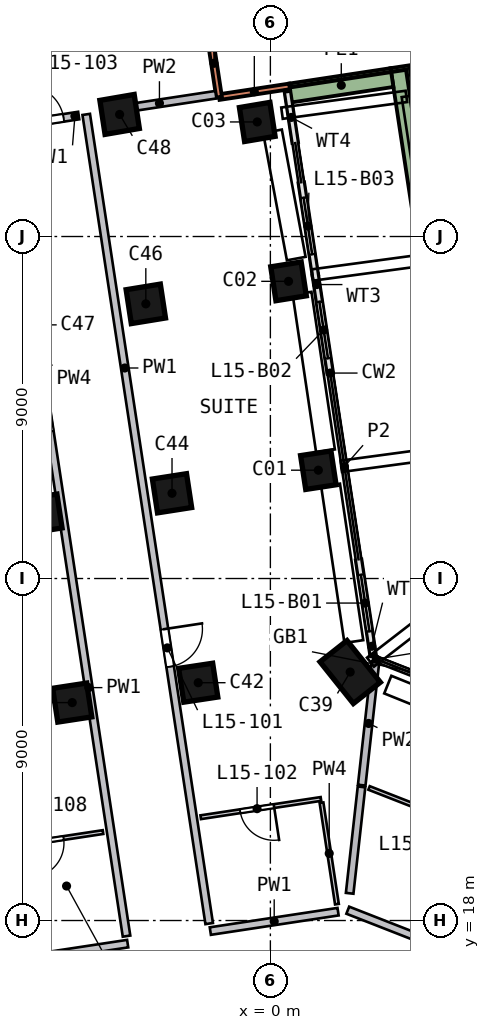
"""IFC4 building model, lengths in metres.
Left out: names, types, materials, properties, quantities, classifications, styles, units other than length and angle.
Written with IfcOpenShell. Run it as: python <this file> out.ifc"""

import sys

from ifc_helpers import new_model, si_unit, direction, frame, frame_2d, origin, origin_2d, place, context, subcontext, project, spatial, rectangle, extrude, element, fill, save


model = new_model("IFC4")
c1 = context("Model", 3, precision=1e-05, world=origin(), true_north=direction((0.0, 1.0)))
c2 = subcontext(c1, "Body", "Model", "MODEL_VIEW")
j1 = project(units=[si_unit("LENGTHUNIT", "METRE"), si_unit("PLANEANGLEUNIT", "RADIAN")], contexts=[c1])
p1 = place(None, origin())
s1 = spatial("IfcSite", under=j1, at=p1, CompositionType="ELEMENT")
p2 = place(p1, origin())
s2 = spatial("IfcBuilding", under=s1, at=p2, CompositionType="ELEMENT")
p3 = place(p2, frame((0.0, 0.0, 68.0)))
s3 = spatial("IfcBuildingStorey", under=s2, at=p3, CompositionType="ELEMENT", Elevation=68.0)
p4 = place(p3, frame((1.426, 29.891, 0.0), z_axis=(-0.13520716, -0.033347057, 0.990256026), x_axis=(-0.152178078, 0.988274013, 0.012502286)))
e1 = element("IfcColumn", 1, at=p4, inside=s3, PredefinedType="COLUMN", context=c2, shape_type="SweptSolid", body=[
    extrude(rectangle(XDim=0.9, YDim=0.8, at=origin_2d()), origin(), (0.0, 0.0, 1.0), 3.221),
])
p5 = place(p3, frame((0.663, 34.913, 0.0), z_axis=(-0.15161007, -0.075654179, 0.985540883), x_axis=(-0.158514591, 0.986022718, 0.051306173)))
e2 = element("IfcColumn", 2, at=p5, inside=s3, PredefinedType="COLUMN", context=c2, shape_type="SweptSolid", body=[
    extrude(rectangle(XDim=0.9, YDim=0.8, at=origin_2d()), origin(), (0.0, 0.0, 1.0), 3.237),
])
p6 = place(p3, frame((-0.144, 39.159, 0.0), z_axis=(-0.164084546, -0.117610165, 0.979410083), x_axis=(-0.166101117, 0.981984673, 0.090091735)))
e3 = element("IfcColumn", 3, at=p6, inside=s3, PredefinedType="COLUMN", context=c2, shape_type="SweptSolid", body=[
    extrude(rectangle(XDim=0.9, YDim=0.8, at=origin_2d()), origin(), (0.0, 0.0, 1.0), 3.257),
])
p7 = place(p3, frame((2.241, 24.527, 0.0), z_axis=(-0.116747517, 0.00972896, 0.993113974), x_axis=(0.616715127, -0.783093296, 0.080170701)))
e4 = element("IfcColumn", 4, at=p7, inside=s3, PredefinedType="COLUMN", context=c2, shape_type="SweptSolid", body=[
    extrude(rectangle(XDim=1.4, YDim=0.9, at=origin_2d()), origin(), (0.0, 0.0, 1.0), 3.212),
])
for number, where, z_axis, x_axis in (
    (5, (-1.76, 24.269, 0.0), (-0.115, -0.009, 0.993), (-0.149, 0.989, -0.008)),
    (6, (-5.078, 23.765, 0.0), (-0.113, -0.025, 0.993), (-0.151, 0.988, 0.008)),
):
    element("IfcColumn", number, at=place(p3, frame(where, z_axis=z_axis, x_axis=x_axis)), inside=s3, PredefinedType="COLUMN", context=c2, shape_type="SweptSolid", body=[
        extrude(rectangle(XDim=0.9, YDim=0.9, at=origin_2d()), origin(), (0.0, 0.0, 1.0), 3.211),
    ])
p8 = place(p3, frame((-2.428, 29.305, 0.0), z_axis=(-0.132201605, -0.051516958, 0.989883194), x_axis=(-0.154308616, 0.987542922, 0.030786825)))
e7 = element("IfcColumn", 7, at=p8, inside=s3, PredefinedType="COLUMN", context=c2, shape_type="SweptSolid", body=[
    extrude(rectangle(XDim=0.9, YDim=0.9, at=origin_2d()), origin(), (0.0, 0.0, 1.0), 3.223),
])
p9 = place(p3, frame((-5.841, 28.787, 0.0), z_axis=(-0.129544243, -0.067687056, 0.98926071), x_axis=(-0.156761028, 0.986518959, 0.046971516)))
e8 = element("IfcColumn", 8, at=p9, inside=s3, PredefinedType="COLUMN", context=c2, shape_type="SweptSolid", body=[
    extrude(rectangle(XDim=0.9, YDim=0.9, at=origin_2d()), origin(), (0.0, 0.0, 1.0), 3.225),
])
p10 = place(p3, frame((-3.096, 34.342, 0.0), z_axis=(-0.148658938, -0.093279151, 0.984479314), x_axis=(-0.161106511, 0.984525146, 0.068955991)))
e9 = element("IfcColumn", 9, at=p10, inside=s3, PredefinedType="COLUMN", context=c2, shape_type="SweptSolid", body=[
    extrude(rectangle(XDim=0.9, YDim=0.9, at=origin_2d()), origin(), (0.0, 0.0, 1.0), 3.24),
])
p11 = place(p3, frame((-3.765, 39.377, 0.0), z_axis=(-0.164608531, -0.134244576, 0.977180856), x_axis=(-0.168918924, 0.979895845, 0.10616275)))
e10 = element("IfcColumn", 10, at=p11, inside=s3, PredefinedType="COLUMN", context=c2, shape_type="SweptSolid", body=[
    extrude(rectangle(XDim=0.9, YDim=0.9, at=origin_2d()), origin(), (0.0, 0.0, 1.0), 3.264),
])
p12 = place(p3, frame((0.504, 39.95, 0.0), z_axis=(0.0, 0.0, 1.0), x_axis=(-0.98866636, -0.150129371, 0.0)))
e11 = element("IfcWall", 11, at=p12, inside=s3, PredefinedType="SOLIDWALL", context=c2, shape_type="SweptSolid", body=[
    extrude(rectangle(XDim=1.875, YDim=0.15, at=frame_2d((0.938, 0.0))), origin(), (0.0, 0.0, 1.0), 3.19),
])
p13 = place(p3, frame((-1.35, 39.669, 0.0), z_axis=(0.0, 0.0, 1.0), x_axis=(-0.150150918, 0.988663088, 0.0)))
e12 = element("IfcWall", 12, at=p13, inside=s3, PredefinedType="SOLIDWALL", context=c2, shape_type="SweptSolid", body=[
    extrude(rectangle(XDim=1.8, YDim=0.15, at=frame_2d((0.9, 0.0))), origin(), (0.0, 0.0, 1.0), 3.19),
])
p14 = place(p3, frame((2.697, 25.017, 0.0), z_axis=(0.0, 0.0, 1.0), x_axis=(-0.150172469, 0.988659815, 0.0)))
e13 = element("IfcWall", 13, at=p14, inside=s3, PredefinedType="SOLIDWALL", context=c2, shape_type="SweptSolid", body=[
    extrude(rectangle(XDim=2.502, YDim=0.15, at=frame_2d((1.251, 0.0))), origin(), (0.0, 0.0, 1.0), 2.425),
])
p15 = place(p14, frame((0.602, 0.0, 0.0)))
e14 = element("IfcOpeningElement", 14, at=p15, cuts=e13, PredefinedType="OPENING", context=c2, shape_type="SweptSolid", body=[
    extrude(rectangle(XDim=1.5, YDim=2.4, at=frame_2d((0.75, 1.2))), frame((0.0, 0.085, 0.0), z_axis=(0.0, -1.0, 0.0), x_axis=(1.0, 0.0, 0.0)), (0.0, 0.0, 1.0), 0.17),
])
p16 = place(p3, frame((1.575, 32.403, 0.0), z_axis=(0.0, 0.0, 1.0), x_axis=(-0.150214162, 0.988653481, 0.0)))
e15 = element("IfcWall", 15, at=p16, inside=s3, PredefinedType="SOLIDWALL", context=c2, shape_type="SweptSolid", body=[
    extrude(rectangle(XDim=2.618, YDim=0.15, at=frame_2d((1.309, 0.0))), origin(), (0.0, 0.0, 1.0), 2.425),
])
p17 = place(p16, frame((0.4, 0.0, 0.0)))
e16 = element("IfcOpeningElement", 16, at=p17, cuts=e15, PredefinedType="OPENING", context=c2, shape_type="SweptSolid", body=[
    extrude(rectangle(XDim=1.5, YDim=2.4, at=frame_2d((0.75, 1.2))), frame((0.0, 0.085, 0.0), z_axis=(0.0, -1.0, 0.0), x_axis=(1.0, 0.0, 0.0)), (0.0, 0.0, 1.0), 0.17),
])
p18 = place(p3, frame((1.182, 34.991, 0.0), z_axis=(0.0, 0.0, 1.0), x_axis=(-0.150259924, 0.988646527, 0.0)))
e17 = element("IfcWall", 17, at=p18, inside=s3, PredefinedType="SOLIDWALL", context=c2, shape_type="SweptSolid", body=[
    extrude(rectangle(XDim=2.45, YDim=0.15, at=frame_2d((1.225, 0.0))), origin(), (0.0, 0.0, 1.0), 2.425),
])
p19 = place(p18, frame((0.55, 0.0, 0.0)))
e18 = element("IfcOpeningElement", 18, at=p19, cuts=e17, PredefinedType="OPENING", context=c2, shape_type="SweptSolid", body=[
    extrude(rectangle(XDim=1.5, YDim=2.4, at=frame_2d((0.75, 1.2))), frame((0.0, 0.085, 0.0), z_axis=(0.0, -1.0, 0.0), x_axis=(1.0, 0.0, 0.0)), (0.0, 0.0, 1.0), 0.17),
])
p20 = place(p3, frame((0.653, 38.473, 0.0), z_axis=(0.0, 0.0, 1.0), x_axis=(-0.15015126, 0.988663036, 0.0)))
e19 = element("IfcWall", 19, at=p20, inside=s3, PredefinedType="SOLIDWALL", context=c2, shape_type="SweptSolid", body=[
    extrude(rectangle(XDim=1.338, YDim=0.15, at=frame_2d((0.669, 0.0))), origin(), (0.0, 0.0, 1.0), 2.425),
])
p21 = place(p3, frame((5.421, 27.229, 0.0), z_axis=(0.0, 0.0, 1.0), x_axis=(-0.150219629, 0.98865265, 0.0)))
e20 = element("IfcWall", 20, at=p21, inside=s3, PredefinedType="SOLIDWALL", context=c2, shape_type="SweptSolid", body=[
    extrude(rectangle(XDim=13.39, YDim=0.5, at=frame_2d((6.695, 0.0))), origin(), (0.0, 0.0, 1.0), 0.7),
])
p22 = place(p3, frame((3.2, 40.183, 0.0), z_axis=(0.0, 0.0, 1.0), x_axis=(-0.988647191, -0.150255557, 0.0)))
e21 = element("IfcWall", 21, at=p22, inside=s3, PredefinedType="SOLIDWALL", context=c2, shape_type="SweptSolid", body=[
    extrude(rectangle(XDim=2.699, YDim=0.5, at=frame_2d((1.349, 0.0))), origin(), (0.0, 0.0, 1.0), 0.7),
])
p23 = place(p3, frame((-6.825, 38.913, 0.0), z_axis=(0.0, 0.0, 1.0), x_axis=(0.988667412, 0.150122447, 0.0)))
e22 = element("IfcWall", 22, at=p23, inside=s3, PredefinedType="SOLIDWALL", context=c2, shape_type="SweptSolid", body=[
    extrude(rectangle(XDim=1.802, YDim=0.2, at=frame_2d((0.901, 0.0))), origin(), (0.0, 0.0, 1.0), 3.19),
])
p24 = place(p23, frame((0.4, 0.0, 0.0)))
e23 = element("IfcOpeningElement", 23, at=p24, cuts=e22, PredefinedType="OPENING", context=c2, shape_type="SweptSolid", body=[
    extrude(rectangle(XDim=1.0, YDim=2.1, at=frame_2d((0.5, 1.05))), frame((0.0, 0.11, 0.0), z_axis=(0.0, -1.0, 0.0), x_axis=(1.0, 0.0, 0.0)), (0.0, 0.0, 1.0), 0.22),
])
p25 = place(p3, frame((-3.755, 17.392, 0.0), z_axis=(0.0, 0.0, 1.0), x_axis=(-0.988654649, -0.150206477, 0.0)))
e24 = element("IfcWall", 24, at=p25, inside=s3, PredefinedType="SOLIDWALL", context=c2, shape_type="SweptSolid", body=[
    extrude(rectangle(XDim=3.678, YDim=0.2, at=frame_2d((1.839, 0.0))), origin(), (0.0, 0.0, 1.0), 3.19),
])
p26 = place(p3, frame((-3.785, 17.589, 0.0), z_axis=(0.0, 0.0, 1.0), x_axis=(-0.150228123, 0.98865136, 0.0)))
e25 = element("IfcWall", 25, at=p26, inside=s3, PredefinedType="SOLIDWALL", context=c2, shape_type="SweptSolid", body=[
    extrude(rectangle(XDim=21.538, YDim=0.2, at=frame_2d((10.769, 0.0))), origin(), (0.0, 0.0, 1.0), 3.19),
])
p27 = place(p26, frame((13.429, 0.0, 0.0)))
e26 = element("IfcOpeningElement", 26, at=p27, cuts=e25, PredefinedType="OPENING", context=c2, shape_type="SweptSolid", body=[
    extrude(rectangle(XDim=1.0, YDim=2.1, at=frame_2d((0.5, 1.05))), frame((0.0, 0.11, 0.0), z_axis=(0.0, -1.0, 0.0), x_axis=(1.0, 0.0, 0.0)), (0.0, 0.0, 1.0), 0.22),
])
p28 = place(p3, frame((-4.846, 39.213, 0.0), z_axis=(0.0, 0.0, 1.0), x_axis=(0.150218727, -0.988652787, 0.0)))
e27 = element("IfcWall", 27, at=p28, inside=s3, PredefinedType="SOLIDWALL", context=c2, shape_type="SweptSolid", body=[
    extrude(rectangle(XDim=21.538, YDim=0.2, at=frame_2d((10.769, 0.0))), origin(), (0.0, 0.0, 1.0), 3.19),
])
p29 = place(p28, frame((13.7, 0.0, 0.0)))
e28 = element("IfcOpeningElement", 28, at=p29, cuts=e27, PredefinedType="OPENING", context=c2, shape_type="SweptSolid", body=[
    extrude(rectangle(XDim=1.0, YDim=2.1, at=frame_2d((0.5, 1.05))), frame((0.0, 0.11, 0.0), z_axis=(0.0, -1.0, 0.0), x_axis=(1.0, 0.0, 0.0)), (0.0, 0.0, 1.0), 0.22),
])
p30 = place(p3, frame((1.781, 18.233, 0.0), z_axis=(0.0, 0.0, 1.0), x_axis=(-0.988652246, -0.150222291, 0.0)))
e29 = element("IfcWall", 29, at=p30, inside=s3, PredefinedType="SOLIDWALL", context=c2, shape_type="SweptSolid", body=[
    extrude(rectangle(XDim=3.4, YDim=0.2, at=frame_2d((1.7, 0.0))), origin(), (0.0, 0.0, 1.0), 3.19),
])
p31 = place(p3, frame((2.037, 18.271, 0.0), z_axis=(0.0, 0.0, 1.0), x_axis=(0.931315451, -0.364213578, 0.0)))
e30 = element("IfcWall", 30, at=p31, inside=s3, PredefinedType="SOLIDWALL", context=c2, shape_type="SweptSolid", body=[
    extrude(rectangle(XDim=9.316, YDim=0.2, at=frame_2d((4.658, 0.0))), origin(), (0.0, 0.0, 1.0), 3.19),
])
p32 = place(p31, frame((3.25, 0.0, 0.0)))
e31 = element("IfcOpeningElement", 31, at=p32, cuts=e30, PredefinedType="OPENING", context=c2, shape_type="SweptSolid", body=[
    extrude(rectangle(XDim=1.0, YDim=2.1, at=frame_2d((0.5, 1.05))), frame((0.0, 0.11, 0.0), z_axis=(0.0, -1.0, 0.0), x_axis=(1.0, 0.0, 0.0)), (0.0, 0.0, 1.0), 0.22),
])
p33 = place(p3, frame((-1.435, 39.731, 0.0), z_axis=(0.0, 0.0, 1.0), x_axis=(-0.988660334, -0.150169049, 0.0)))
e32 = element("IfcWall", 32, at=p33, inside=s3, PredefinedType="SOLIDWALL", context=c2, shape_type="SweptSolid", body=[
    extrude(rectangle(XDim=3.003, YDim=0.2, at=frame_2d((1.501, 0.0))), origin(), (0.0, 0.0, 1.0), 3.19),
])
p34 = place(p3, frame((2.398, 21.516, 0.0), z_axis=(0.0, 0.0, 1.0), x_axis=(-0.110735845, -0.993849874, 0.0)))
e33 = element("IfcWall", 33, at=p34, inside=s3, PredefinedType="SOLIDWALL", context=c2, shape_type="SweptSolid", body=[
    extrude(rectangle(XDim=2.818, YDim=0.2, at=frame_2d((1.409, 0.0))), origin(), (0.0, 0.0, 1.0), 3.19),
])
p35 = place(p3, frame((2.765, 24.81, 0.0), z_axis=(0.0, 0.0, 1.0), x_axis=(-0.110775855, -0.993845416, 0.0)))
e34 = element("IfcWall", 34, at=p35, inside=s3, PredefinedType="SOLIDWALL", context=c2, shape_type="SweptSolid", body=[
    extrude(rectangle(XDim=3.268, YDim=0.2, at=frame_2d((1.634, 0.0))), origin(), (0.0, 0.0, 1.0), 3.19),
])
p36 = place(p3, frame((-5.692, 28.809, 0.0), z_axis=(0.0, 0.0, 1.0), x_axis=(-0.988655539, -0.150200614, 0.0)))
e35 = element("IfcWall", 35, at=p36, inside=s3, PredefinedType="PARTITIONING", context=c2, shape_type="SweptSolid", body=[
    extrude(rectangle(XDim=5.05, YDim=0.1, at=frame_2d((2.525, 0.0))), origin(), (0.0, 0.0, 1.0), 3.19),
])
p37 = place(p36, frame((2.6, 0.0, 0.0)))
e36 = element("IfcOpeningElement", 36, at=p37, cuts=e35, PredefinedType="OPENING", context=c2, shape_type="SweptSolid", body=[
    extrude(rectangle(XDim=1.0, YDim=2.1, at=frame_2d((0.5, 1.05))), frame((0.0, 0.06, 0.0), z_axis=(0.0, -1.0, 0.0), x_axis=(1.0, 0.0, 0.0)), (0.0, 0.0, 1.0), 0.12),
])
p38 = place(p3, frame((-4.404, 20.327, 0.0), z_axis=(0.0, 0.0, 1.0), x_axis=(-0.988657544, -0.150187422, 0.0)))
e37 = element("IfcWall", 37, at=p38, inside=s3, PredefinedType="PARTITIONING", context=c2, shape_type="SweptSolid", body=[
    extrude(rectangle(XDim=3.199, YDim=0.1, at=frame_2d((1.6, 0.0))), origin(), (0.0, 0.0, 1.0), 3.19),
])
p39 = place(p38, frame((1.05, 0.0, 0.0)))
e38 = element("IfcOpeningElement", 38, at=p39, cuts=e37, PredefinedType="OPENING", context=c2, shape_type="SweptSolid", body=[
    extrude(rectangle(XDim=0.9, YDim=2.1, at=frame_2d((0.45, 1.05))), frame((0.0, 0.06, 0.0), z_axis=(0.0, -1.0, 0.0), x_axis=(1.0, 0.0, 0.0)), (0.0, 0.0, 1.0), 0.12),
])
p40 = place(p3, frame((1.331, 21.199, 0.0), z_axis=(0.0, 0.0, 1.0), x_axis=(-0.988653098, -0.15021668, 0.0)))
e39 = element("IfcWall", 39, at=p40, inside=s3, PredefinedType="PARTITIONING", context=c2, shape_type="SweptSolid", body=[
    extrude(rectangle(XDim=3.2, YDim=0.1, at=frame_2d((1.6, 0.0))), origin(), (0.0, 0.0, 1.0), 3.19),
])
p41 = place(p40, frame((1.25, 0.0, 0.0)))
e40 = element("IfcOpeningElement", 40, at=p41, cuts=e39, PredefinedType="OPENING", context=c2, shape_type="SweptSolid", body=[
    extrude(rectangle(XDim=0.9, YDim=2.1, at=frame_2d((0.45, 1.05))), frame((0.0, 0.06, 0.0), z_axis=(0.0, -1.0, 0.0), x_axis=(1.0, 0.0, 0.0)), (0.0, 0.0, 1.0), 0.12),
])
p42 = place(p3, frame((1.345, 21.1, 0.0), z_axis=(0.0, 0.0, 1.0), x_axis=(0.150276776, -0.988643966, 0.0)))
e41 = element("IfcWall", 41, at=p42, inside=s3, PredefinedType="PARTITIONING", context=c2, shape_type="SweptSolid", body=[
    extrude(rectangle(XDim=2.7, YDim=0.1, at=frame_2d((1.35, 0.0))), origin(), (0.0, 0.0, 1.0), 3.19),
])
p43 = place(p3, frame((2.596, 21.489, 0.0), z_axis=(0.0, 0.0, 1.0), x_axis=(0.931289003, -0.364281199, 0.0)))
e42 = element("IfcWall", 42, at=p43, inside=s3, PredefinedType="PARTITIONING", context=c2, shape_type="SweptSolid", body=[
    extrude(rectangle(XDim=3.35, YDim=0.1, at=frame_2d((1.675, 0.0))), origin(), (0.0, 0.0, 1.0), 3.19),
])
p44 = place(p15, origin())
e43 = element("IfcDoor", 43, at=p44, inside=s3, OperationType="SLIDING_TO_LEFT", PredefinedType="DOOR", context=c2, shape_type="SweptSolid", body=[
    extrude(rectangle(XDim=1.5, YDim=2.4, at=frame_2d((0.75, 1.2))), frame((0.0, 0.025, 0.0), z_axis=(0.0, -1.0, 0.0), x_axis=(1.0, 0.0, 0.0)), (0.0, 0.0, 1.0), 0.05),
])
fill(e14, e43)
p45 = place(p17, origin())
e44 = element("IfcDoor", 44, at=p45, inside=s3, OperationType="SLIDING_TO_RIGHT", PredefinedType="DOOR", context=c2, shape_type="SweptSolid", body=[
    extrude(rectangle(XDim=1.5, YDim=2.4, at=frame_2d((0.75, 1.2))), frame((0.0, 0.025, 0.0), z_axis=(0.0, -1.0, 0.0), x_axis=(1.0, 0.0, 0.0)), (0.0, 0.0, 1.0), 0.05),
])
fill(e16, e44)
p46 = place(p19, origin())
e45 = element("IfcDoor", 45, at=p46, inside=s3, OperationType="SLIDING_TO_LEFT", PredefinedType="DOOR", context=c2, shape_type="SweptSolid", body=[
    extrude(rectangle(XDim=1.5, YDim=2.4, at=frame_2d((0.75, 1.2))), frame((0.0, 0.025, 0.0), z_axis=(0.0, -1.0, 0.0), x_axis=(1.0, 0.0, 0.0)), (0.0, 0.0, 1.0), 0.05),
])
fill(e18, e45)
p47 = place(p29, origin())
e46 = element("IfcDoor", 46, at=p47, inside=s3, OperationType="SINGLE_SWING_LEFT", PredefinedType="DOOR", context=c2, shape_type="SweptSolid", body=[
    extrude(rectangle(XDim=1.0, YDim=2.1, at=frame_2d((0.5, 1.05))), frame((0.0, 0.025, 0.0), z_axis=(0.0, -1.0, 0.0), x_axis=(1.0, 0.0, 0.0)), (0.0, 0.0, 1.0), 0.05),
])
fill(e28, e46)
p48 = place(p41, origin())
e47 = element("IfcDoor", 47, at=p48, inside=s3, OperationType="SINGLE_SWING_LEFT", PredefinedType="DOOR", context=c2, shape_type="SweptSolid", body=[
    extrude(rectangle(XDim=0.9, YDim=2.1, at=frame_2d((0.45, 1.05))), frame((0.0, 0.025, 0.0), z_axis=(0.0, -1.0, 0.0), x_axis=(1.0, 0.0, 0.0)), (0.0, 0.0, 1.0), 0.05),
])
fill(e40, e47)
p49 = place(p24, origin())
e48 = element("IfcDoor", 48, at=p49, inside=s3, OperationType="SINGLE_SWING_LEFT", PredefinedType="DOOR", context=c2, shape_type="SweptSolid", body=[
    extrude(rectangle(XDim=1.0, YDim=2.1, at=frame_2d((0.5, 1.05))), frame((0.0, 0.025, 0.0), z_axis=(0.0, -1.0, 0.0), x_axis=(1.0, 0.0, 0.0)), (0.0, 0.0, 1.0), 0.05),
])
fill(e23, e48)
p50 = place(p39, origin())
e49 = element("IfcDoor", 49, at=p50, inside=s3, OperationType="SINGLE_SWING_RIGHT", PredefinedType="DOOR", context=c2, shape_type="SweptSolid", body=[
    extrude(rectangle(XDim=0.9, YDim=2.1, at=frame_2d((0.45, 1.05))), frame((0.0, 0.025, 0.0), z_axis=(0.0, -1.0, 0.0), x_axis=(1.0, 0.0, 0.0)), (0.0, 0.0, 1.0), 0.05),
])
fill(e38, e49)
save(model, sys.argv[1])
